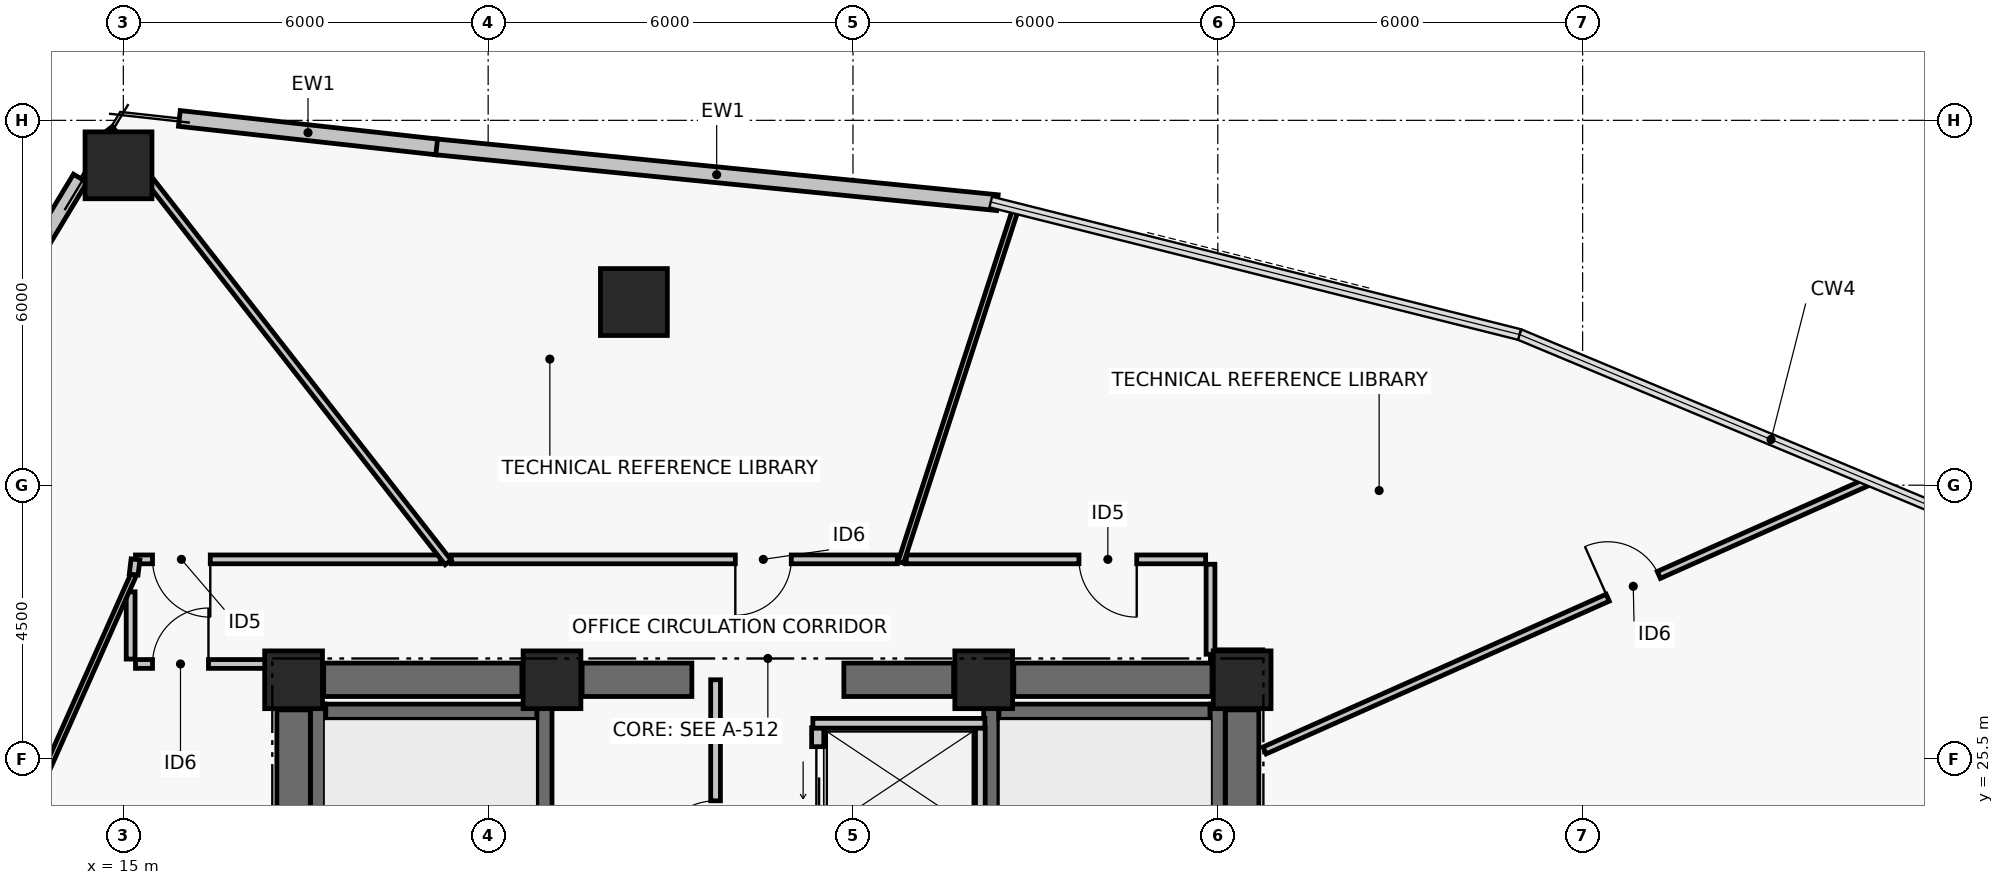
"""IFC4 building model, lengths in metres.
Left out: names, types, materials, properties, quantities, classifications, styles, units other than length and angle.
Written with IfcOpenShell. Run it as: python <this file> out.ifc"""

import sys

from ifc_helpers import new_model, si_unit, direction, frame, frame_2d, origin, origin_2d, place, context, subcontext, project, spatial, rectangle, hollow_rectangle, extrude, element, fill, save


model = new_model("IFC4")
c1 = context("Model", 3, precision=1e-05, world=origin(), true_north=direction((0.0, 1.0)))
c2 = subcontext(c1, "Body", "Model", "MODEL_VIEW")
j1 = project(units=[si_unit("LENGTHUNIT", "METRE"), si_unit("PLANEANGLEUNIT", "RADIAN")], contexts=[c1])
p1 = place(None, origin())
s1 = spatial("IfcSite", under=j1, at=p1, CompositionType="ELEMENT")
p2 = place(p1, origin())
s2 = spatial("IfcBuilding", under=s1, at=p2, CompositionType="ELEMENT")
p3 = place(p2, frame((0.0, 0.0, 161.76)))
s3 = spatial("IfcBuildingStorey", under=s2, at=p3, CompositionType="ELEMENT", Elevation=161.76)
for number, where, z_axis, x_axis in (
    (1, (17.8, 26.8, 0.0), (0.0, 0.0, 1.0), (1.0, 0.0, 0.0)),
    (2, (22.05, 26.8, 0.0), (0.0, 0.0, 1.0), (1.0, 0.0, 0.0)),
    (3, (29.15, 26.8, 0.0), (0.0, 0.0, 1.0), (1.0, 0.0, 0.0)),
    (4, (33.4, 26.8, 0.0), (0.0, 0.0, 1.0), (1.0, 0.0, 0.0)),
):
    element("IfcColumn", number, at=place(p3, frame(where, z_axis=z_axis, x_axis=x_axis)), inside=s3, PredefinedType="COLUMN", context=c2, shape_type="SweptSolid", body=[
        extrude(rectangle(XDim=0.95, YDim=0.95, at=origin_2d()), origin(), (0.0, 0.0, 1.0), 3.72),
    ])
p4 = place(p3, frame((18.295, 26.8, 0.0), z_axis=(0.0, 0.0, 1.0), x_axis=(1.0, 0.0, 0.0)))
e5 = element("IfcWall", 5, at=p4, inside=s3, PredefinedType="SHEAR", context=c2, shape_type="SweptSolid", body=[
    extrude(rectangle(XDim=3.26, YDim=0.55, at=frame_2d((1.63, 0.0))), origin(), (0.0, 0.0, 1.0), 3.5),
])
p5 = place(p3, frame((22.545, 26.8, 0.0), z_axis=(0.0, 0.0, 1.0), x_axis=(1.0, 0.0, 0.0)))
e6 = element("IfcWall", 6, at=p5, inside=s3, PredefinedType="SHEAR", context=c2, shape_type="SweptSolid", body=[
    extrude(rectangle(XDim=1.805, YDim=0.55, at=frame_2d((0.903, 0.0))), origin(), (0.0, 0.0, 1.0), 3.5),
])
p6 = place(p3, frame((26.85, 26.8, 0.0), z_axis=(0.0, 0.0, 1.0), x_axis=(1.0, 0.0, 0.0)))
e7 = element("IfcWall", 7, at=p6, inside=s3, PredefinedType="SHEAR", context=c2, shape_type="SweptSolid", body=[
    extrude(rectangle(XDim=1.805, YDim=0.55, at=frame_2d((0.902, 0.0))), origin(), (0.0, 0.0, 1.0), 3.5),
])
p7 = place(p3, frame((29.645, 26.8, 0.0), z_axis=(0.0, 0.0, 1.0), x_axis=(1.0, 0.0, 0.0)))
e8 = element("IfcWall", 8, at=p7, inside=s3, PredefinedType="SHEAR", context=c2, shape_type="SweptSolid", body=[
    extrude(rectangle(XDim=3.26, YDim=0.55, at=frame_2d((1.63, 0.0))), origin(), (0.0, 0.0, 1.0), 3.5),
])
for number, where, z_axis, x_axis in (
    (9, (17.8, 17.695, 0.0), (0.0, 0.0, 1.0), (0.0, 1.0, 0.0)),
    (10, (33.4, 17.695, 0.0), (0.0, 0.0, 1.0), (0.0, 1.0, 0.0)),
):
    element("IfcWall", number, at=place(p3, frame(where, z_axis=z_axis, x_axis=x_axis)), inside=s3, PredefinedType="SHEAR", context=c2, shape_type="SweptSolid", body=[
        extrude(rectangle(XDim=8.61, YDim=0.55, at=frame_2d((4.305, 0.0))), origin(), (0.0, 0.0, 1.0), 3.5),
    ])
p8 = place(p3, frame((18.204, 17.6, 0.0), z_axis=(0.0, 0.0, 1.0), x_axis=(0.0, 1.0, 0.0)))
e11 = element("IfcWall", 11, at=p8, inside=s3, PredefinedType="SHEAR", context=c2, shape_type="SweptSolid", body=[
    extrude(rectangle(XDim=8.8, YDim=0.25, at=frame_2d((4.4, 0.0))), origin(), (0.0, 0.0, 1.0), 3.5),
])
p9 = place(p3, frame((21.925, 17.6, 0.0), z_axis=(0.0, 0.0, 1.0), x_axis=(0.0, 1.0, 0.0)))
e12 = element("IfcWall", 12, at=p9, inside=s3, PredefinedType="SHEAR", context=c2, shape_type="SweptSolid", body=[
    extrude(rectangle(XDim=8.8, YDim=0.25, at=frame_2d((4.4, 0.0))), origin(), (0.0, 0.0, 1.0), 3.5),
])
p10 = place(p9, frame((0.35, 0.0, 0.0)))
e13 = element("IfcOpeningElement", 13, at=p10, cuts=e12, PredefinedType="OPENING", context=c2, shape_type="SweptSolid", body=[
    extrude(rectangle(XDim=1.05, YDim=2.08, at=frame_2d((0.525, 1.04))), frame((0.0, 0.135, 0.0), z_axis=(0.0, -1.0, 0.0), x_axis=(1.0, 0.0, 0.0)), (0.0, 0.0, 1.0), 0.27),
])
p11 = place(p3, frame((18.329, 26.275, 0.0), z_axis=(0.0, 0.0, 1.0), x_axis=(1.0, 0.0, 0.0)))
e14 = element("IfcWall", 14, at=p11, inside=s3, PredefinedType="SHEAR", context=c2, shape_type="SweptSolid", body=[
    extrude(rectangle(XDim=3.471, YDim=0.25, at=frame_2d((1.735, 0.0))), origin(), (0.0, 0.0, 1.0), 3.5),
])
p12 = place(p3, frame((29.275, 17.6, 0.0), z_axis=(0.0, 0.0, 1.0), x_axis=(0.0, 1.0, 0.0)))
e15 = element("IfcWall", 15, at=p12, inside=s3, PredefinedType="SHEAR", context=c2, shape_type="SweptSolid", body=[
    extrude(rectangle(XDim=8.8, YDim=0.25, at=frame_2d((4.4, 0.0))), origin(), (0.0, 0.0, 1.0), 3.5),
])
p13 = place(p12, frame((0.35, 0.0, 0.0)))
e16 = element("IfcOpeningElement", 16, at=p13, cuts=e15, PredefinedType="OPENING", context=c2, shape_type="SweptSolid", body=[
    extrude(rectangle(XDim=1.05, YDim=2.08, at=frame_2d((0.525, 1.04))), frame((0.0, 0.135, 0.0), z_axis=(0.0, -1.0, 0.0), x_axis=(1.0, 0.0, 0.0)), (0.0, 0.0, 1.0), 0.27),
])
p14 = place(p3, frame((32.996, 17.6, 0.0), z_axis=(0.0, 0.0, 1.0), x_axis=(0.0, 1.0, 0.0)))
e17 = element("IfcWall", 17, at=p14, inside=s3, PredefinedType="SHEAR", context=c2, shape_type="SweptSolid", body=[
    extrude(rectangle(XDim=8.8, YDim=0.25, at=frame_2d((4.4, 0.0))), origin(), (0.0, 0.0, 1.0), 3.5),
])
p15 = place(p3, frame((29.4, 26.275, 0.0), z_axis=(0.0, 0.0, 1.0), x_axis=(1.0, 0.0, 0.0)))
e18 = element("IfcWall", 18, at=p15, inside=s3, PredefinedType="SHEAR", context=c2, shape_type="SweptSolid", body=[
    extrude(rectangle(XDim=3.471, YDim=0.25, at=frame_2d((1.736, 0.0))), origin(), (0.0, 0.0, 1.0), 3.5),
])
for number, where, z_axis, x_axis in (
    (19, (23.397, 33.012, 0.0), (0.0, 0.0, 1.0), (1.0, 0.0, 0.0)),
    (20, (14.92, 35.26, 0.0), (0.0, 0.0, 1.0), (1.0, 0.0, 0.0)),
):
    element("IfcColumn", number, at=place(p3, frame(where, z_axis=z_axis, x_axis=x_axis)), inside=s3, PredefinedType="COLUMN", context=c2, shape_type="SweptSolid", body=[
        extrude(hollow_rectangle(XDim=1.1, YDim=1.1, WallThickness=0.045, at=origin_2d()), origin(), (0.0, 0.0, 1.0), 3.72),
    ])
p16 = place(p3, frame((20.141, 35.565, 0.0), z_axis=(0.0, 0.0, 1.0), x_axis=(0.9950896707, -0.098977508888, 0.0)))
e21 = element("IfcWall", 21, at=p16, inside=s3, PredefinedType="PARTITIONING", context=c2, shape_type="SweptSolid", body=[
    extrude(rectangle(XDim=9.28, YDim=0.26, at=frame_2d((4.64, 0.0))), origin(), (0.0, 0.0, 1.0), 3.5),
])
p17 = place(p3, frame((15.921, 36.031, 0.0), z_axis=(0.0, 0.0, 1.0), x_axis=(0.993933978819, -0.109978387641, 0.0)))
e22 = element("IfcWall", 22, at=p17, inside=s3, PredefinedType="PARTITIONING", context=c2, shape_type="SweptSolid", body=[
    extrude(rectangle(XDim=4.258, YDim=0.26, at=frame_2d((2.129, 0.0))), origin(), (0.0, 0.0, 1.0), 3.5),
])
p18 = place(p3, frame((13.221, 33.272, 0.0), z_axis=(0.0, 0.0, 1.0), x_axis=(0.516157331647, 0.856493788061, 0.0)))
e23 = element("IfcWall", 23, at=p18, inside=s3, PredefinedType="PARTITIONING", context=c2, shape_type="SweptSolid", body=[
    extrude(rectangle(XDim=2.073, YDim=0.26, at=frame_2d((1.037, 0.0))), origin(), (0.0, 0.0, 1.0), 3.5),
])
p19 = place(p3, frame((26.42, 24.29, 0.0), z_axis=(0.0, 0.0, 1.0), x_axis=(0.0, 1.0, 0.0)))
e24 = element("IfcWall", 24, at=p19, inside=s3, PredefinedType="PARTITIONING", context=c2, shape_type="SweptSolid", body=[
    extrude(rectangle(XDim=1.72, YDim=0.2, at=frame_2d((0.86, 0.0))), origin(), (0.0, 0.0, 1.0), 3.5),
])
p20 = place(p19, frame((0.31, 0.0, 0.0)))
e25 = element("IfcOpeningElement", 25, at=p20, cuts=e24, PredefinedType="OPENING", context=c2, shape_type="SweptSolid", body=[
    extrude(rectangle(XDim=1.1, YDim=2.08, at=frame_2d((0.55, 1.04))), frame((0.0, 0.11, 0.0), z_axis=(0.0, -1.0, 0.0), x_axis=(1.0, 0.0, 0.0)), (0.0, 0.0, 1.0), 0.22),
])
p21 = place(p3, frame((29.095, 20.56, 0.0), z_axis=(0.0, 0.0, 1.0), x_axis=(0.0, 1.0, 0.0)))
e26 = element("IfcWall", 26, at=p21, inside=s3, PredefinedType="PARTITIONING", context=c2, shape_type="SweptSolid", body=[
    extrude(rectangle(XDim=5.45, YDim=0.16, at=frame_2d((2.725, 0.0))), origin(), (0.0, 0.0, 1.0), 3.5),
])
p22 = place(p3, frame((26.34, 26.085, 0.0), z_axis=(0.0, 0.0, 1.0), x_axis=(1.0, 0.0, 0.0)))
e27 = element("IfcWall", 27, at=p22, inside=s3, PredefinedType="PARTITIONING", context=c2, shape_type="SweptSolid", body=[
    extrude(rectangle(XDim=2.83, YDim=0.16, at=frame_2d((1.415, 0.0))), origin(), (0.0, 0.0, 1.0), 3.5),
])
p23 = place(p3, frame((24.74, 22.43, 0.0), z_axis=(0.0, 0.0, 1.0), x_axis=(0.0, 1.0, 0.0)))
e28 = element("IfcWall", 28, at=p23, inside=s3, PredefinedType="PARTITIONING", context=c2, shape_type="SweptSolid", body=[
    extrude(rectangle(XDim=4.37, YDim=0.16, at=frame_2d((2.185, 0.0))), origin(), (0.0, 0.0, 1.0), 2.63),
])
p24 = place(p23, frame((1.4, 0.0, 0.0)))
e29 = element("IfcOpeningElement", 29, at=p24, cuts=e28, PredefinedType="OPENING", context=c2, shape_type="SweptSolid", body=[
    extrude(rectangle(XDim=0.98, YDim=2.06, at=frame_2d((0.49, 1.03))), frame((0.0, 0.09, 0.0), z_axis=(0.0, -1.0, 0.0), x_axis=(1.0, 0.0, 0.0)), (0.0, 0.0, 1.0), 0.18),
])
p25 = place(p3, frame((33.74, 27.22, 0.0), z_axis=(0.0, 0.0, 1.0), x_axis=(-1.0, 0.0, 0.0)))
e30 = element("IfcWall", 30, at=p25, inside=s3, PredefinedType="PARTITIONING", context=c2, shape_type="SweptSolid", body=[
    extrude(rectangle(XDim=0.86, YDim=0.145, at=frame_2d((0.43, 0.0))), origin(), (0.0, 0.0, 1.0), 2.63),
])
p26 = place(p3, frame((32.88, 27.22, 0.0), z_axis=(0.0, 0.0, 1.0), x_axis=(0.0, 1.0, 0.0)))
e31 = element("IfcWall", 31, at=p26, inside=s3, PredefinedType="PARTITIONING", context=c2, shape_type="SweptSolid", body=[
    extrude(rectangle(XDim=1.48, YDim=0.145, at=frame_2d((0.74, 0.0))), origin(), (0.0, 0.0, 1.0), 2.63),
])
p27 = place(p3, frame((32.8, 28.78, 0.0), z_axis=(0.0, 0.0, 1.0), x_axis=(-1.0, 0.0, 0.0)))
e32 = element("IfcWall", 32, at=p27, inside=s3, PredefinedType="PARTITIONING", context=c2, shape_type="SweptSolid", body=[
    extrude(rectangle(XDim=4.923, YDim=0.145, at=frame_2d((2.462, 0.0))), origin(), (0.0, 0.0, 1.0), 2.93),
])
p28 = place(p27, frame((1.133, 0.0, 0.0)))
e33 = element("IfcOpeningElement", 33, at=p28, cuts=e32, PredefinedType="OPENING", context=c2, shape_type="SweptSolid", body=[
    extrude(rectangle(XDim=0.95, YDim=2.06, at=frame_2d((0.475, 1.03))), frame((0.0, 0.083, 0.0), z_axis=(0.0, -1.0, 0.0), x_axis=(1.0, 0.0, 0.0)), (0.0, 0.0, 1.0), 0.165),
])
p29 = place(p3, frame((27.729, 28.78, 0.0), z_axis=(0.0, 0.0, 1.0), x_axis=(-1.0, 0.0, 0.0)))
e34 = element("IfcWall", 34, at=p29, inside=s3, PredefinedType="PARTITIONING", context=c2, shape_type="SweptSolid", body=[
    extrude(rectangle(XDim=7.338, YDim=0.145, at=frame_2d((3.669, 0.0))), origin(), (0.0, 0.0, 1.0), 2.73),
])
p30 = place(p29, frame((1.744, 0.0, 0.0)))
e35 = element("IfcOpeningElement", 35, at=p30, cuts=e34, PredefinedType="OPENING", context=c2, shape_type="SweptSolid", body=[
    extrude(rectangle(XDim=0.92, YDim=2.05, at=frame_2d((0.46, 1.025))), frame((0.0, 0.083, 0.0), z_axis=(0.0, -1.0, 0.0), x_axis=(1.0, 0.0, 0.0)), (0.0, 0.0, 1.0), 0.165),
])
p31 = place(p3, frame((20.214, 28.78, 0.0), z_axis=(0.0, 0.0, 1.0), x_axis=(-1.0, 0.0, 0.0)))
e36 = element("IfcWall", 36, at=p31, inside=s3, PredefinedType="PARTITIONING", context=c2, shape_type="SweptSolid", body=[
    extrude(rectangle(XDim=5.014, YDim=0.145, at=frame_2d((2.507, 0.0))), origin(), (0.0, 0.0, 1.0), 2.73),
])
p32 = place(p31, frame((3.784, 0.0, 0.0)))
e37 = element("IfcOpeningElement", 37, at=p32, cuts=e36, PredefinedType="OPENING", context=c2, shape_type="SweptSolid", body=[
    extrude(rectangle(XDim=0.95, YDim=2.06, at=frame_2d((0.475, 1.03))), frame((0.0, 0.083, 0.0), z_axis=(0.0, -1.0, 0.0), x_axis=(1.0, 0.0, 0.0)), (0.0, 0.0, 1.0), 0.165),
])
p33 = place(p3, frame((15.2, 27.06, 0.0), z_axis=(0.0, 0.0, 1.0), x_axis=(1.0, 0.0, 0.0)))
e38 = element("IfcWall", 38, at=p33, inside=s3, PredefinedType="PARTITIONING", context=c2, shape_type="SweptSolid", body=[
    extrude(rectangle(XDim=2.18, YDim=0.145, at=frame_2d((1.09, 0.0))), origin(), (0.0, 0.0, 1.0), 2.73),
])
p34 = place(p33, frame((0.28, 0.0, 0.0)))
e39 = element("IfcOpeningElement", 39, at=p34, cuts=e38, PredefinedType="OPENING", context=c2, shape_type="SweptSolid", body=[
    extrude(rectangle(XDim=0.92, YDim=2.05, at=frame_2d((0.46, 1.025))), frame((0.0, 0.083, 0.0), z_axis=(0.0, -1.0, 0.0), x_axis=(1.0, 0.0, 0.0)), (0.0, 0.0, 1.0), 0.165),
])
p35 = place(p3, frame((15.12, 28.247, 0.0), z_axis=(0.0, 0.0, 1.0), x_axis=(0.0, -1.0, 0.0)))
e40 = element("IfcWall", 40, at=p35, inside=s3, PredefinedType="PARTITIONING", context=c2, shape_type="SweptSolid", body=[
    extrude(rectangle(XDim=1.107, YDim=0.145, at=frame_2d((0.553, 0.0))), origin(), (0.0, 0.0, 1.0), 2.73),
])
p36 = place(p3, frame((33.77, 25.637, 0.0), z_axis=(0.0, 0.0, 1.0), x_axis=(0.913542006179, 0.406744395102, 0.0)))
e41 = element("IfcWall", 41, at=p36, inside=s3, PredefinedType="PARTITIONING", context=c2, shape_type="SweptSolid", body=[
    extrude(rectangle(XDim=10.915, YDim=0.125, at=frame_2d((5.457, 0.0))), origin(), (0.0, 0.0, 1.0), 2.63),
])
p37 = place(p36, frame((6.177, 0.0, 0.0)))
e42 = element("IfcOpeningElement", 42, at=p37, cuts=e41, PredefinedType="OPENING", context=c2, shape_type="SweptSolid", body=[
    extrude(rectangle(XDim=0.92, YDim=2.05, at=frame_2d((0.46, 1.025))), frame((0.0, 0.073, 0.0), z_axis=(0.0, -1.0, 0.0), x_axis=(1.0, 0.0, 0.0)), (0.0, 0.0, 1.0), 0.145),
])
p38 = place(p3, frame((27.787, 28.73, 0.0), z_axis=(0.0, 0.0, 1.0), x_axis=(0.309017664707, 0.951056298491, 0.0)))
e43 = element("IfcWall", 43, at=p38, inside=s3, PredefinedType="PARTITIONING", context=c2, shape_type="SweptSolid", body=[
    extrude(rectangle(XDim=6.133, YDim=0.095, at=frame_2d((3.067, 0.0))), origin(), (0.0, 0.0, 1.0), 2.93),
])
p39 = place(p3, frame((20.342, 28.73, 0.0), z_axis=(0.0, 0.0, 1.0), x_axis=(-0.615659223334, 0.78801251305, 0.0)))
e44 = element("IfcWall", 44, at=p39, inside=s3, PredefinedType="PARTITIONING", context=c2, shape_type="SweptSolid", body=[
    extrude(rectangle(XDim=9.05, YDim=0.125, at=frame_2d((4.525, 0.0))), origin(), (0.0, 0.0, 1.0), 2.93),
])
p40 = place(p3, frame((15.17, 28.531, 0.0), z_axis=(0.0, 0.0, 1.0), x_axis=(-0.406717829794, -0.913553833623, 0.0)))
e45 = element("IfcWall", 45, at=p40, inside=s3, PredefinedType="PARTITIONING", context=c2, shape_type="SweptSolid", body=[
    extrude(rectangle(XDim=8.718, YDim=0.095, at=frame_2d((4.359, 0.0))), origin(), (0.0, 0.0, 1.0), 2.73),
])
p41 = place(p3, frame((15.2, 28.78, 0.0), z_axis=(0.0, 0.0, 1.0), x_axis=(-0.119720914767, -0.992807585873, 0.0)))
e46 = element("IfcWall", 46, at=p41, inside=s3, PredefinedType="PARTITIONING", context=c2, shape_type="SweptSolid", body=[
    extrude(rectangle(XDim=0.251, YDim=0.145, at=frame_2d((0.125, 0.0))), origin(), (0.0, 0.0, 1.0), 3.5),
])
p42 = place(p20, origin())
e47 = element("IfcDoor", 47, at=p42, inside=s3, OperationType="DOUBLE_DOOR_SLIDING", PredefinedType="DOOR", context=c2, shape_type="SweptSolid", body=[
    extrude(rectangle(XDim=1.1, YDim=2.08, at=frame_2d((0.55, 1.04))), frame((0.0, 0.025, 0.0), z_axis=(0.0, -1.0, 0.0), x_axis=(1.0, 0.0, 0.0)), (0.0, 0.0, 1.0), 0.05),
])
fill(e25, e47)
p43 = place(p24, origin())
e48 = element("IfcDoor", 48, at=p43, inside=s3, OperationType="SINGLE_SWING_LEFT", PredefinedType="DOOR", context=c2, shape_type="SweptSolid", body=[
    extrude(rectangle(XDim=0.98, YDim=2.06, at=frame_2d((0.49, 1.03))), frame((0.0, 0.025, 0.0), z_axis=(0.0, -1.0, 0.0), x_axis=(1.0, 0.0, 0.0)), (0.0, 0.0, 1.0), 0.05),
])
fill(e29, e48)
p44 = place(p28, origin())
e49 = element("IfcDoor", 49, at=p44, inside=s3, OperationType="SINGLE_SWING_LEFT", PredefinedType="DOOR", context=c2, shape_type="SweptSolid", body=[
    extrude(rectangle(XDim=0.95, YDim=2.06, at=frame_2d((0.475, 1.03))), frame((0.0, 0.025, 0.0), z_axis=(0.0, -1.0, 0.0), x_axis=(1.0, 0.0, 0.0)), (0.0, 0.0, 1.0), 0.05),
])
fill(e33, e49)
p45 = place(p30, origin())
e50 = element("IfcDoor", 50, at=p45, inside=s3, OperationType="SINGLE_SWING_RIGHT", PredefinedType="DOOR", context=c2, shape_type="SweptSolid", body=[
    extrude(rectangle(XDim=0.92, YDim=2.05, at=frame_2d((0.46, 1.025))), frame((0.0, 0.025, 0.0), z_axis=(0.0, -1.0, 0.0), x_axis=(1.0, 0.0, 0.0)), (0.0, 0.0, 1.0), 0.05),
])
fill(e35, e50)
p46 = place(p32, origin())
e51 = element("IfcDoor", 51, at=p46, inside=s3, OperationType="SINGLE_SWING_LEFT", PredefinedType="DOOR", context=c2, shape_type="SweptSolid", body=[
    extrude(rectangle(XDim=0.95, YDim=2.06, at=frame_2d((0.475, 1.03))), frame((0.0, 0.025, 0.0), z_axis=(0.0, -1.0, 0.0), x_axis=(1.0, 0.0, 0.0)), (0.0, 0.0, 1.0), 0.05),
])
fill(e37, e51)
p47 = place(p34, origin())
e52 = element("IfcDoor", 52, at=p47, inside=s3, OperationType="SINGLE_SWING_RIGHT", PredefinedType="DOOR", context=c2, shape_type="SweptSolid", body=[
    extrude(rectangle(XDim=0.92, YDim=2.05, at=frame_2d((0.46, 1.025))), frame((0.0, 0.025, 0.0), z_axis=(0.0, -1.0, 0.0), x_axis=(1.0, 0.0, 0.0)), (0.0, 0.0, 1.0), 0.05),
])
fill(e39, e52)
p48 = place(p37, origin())
e53 = element("IfcDoor", 53, at=p48, inside=s3, OperationType="SINGLE_SWING_LEFT", PredefinedType="DOOR", context=c2, shape_type="SweptSolid", body=[
    extrude(rectangle(XDim=0.92, YDim=2.05, at=frame_2d((0.46, 1.025))), frame((0.0, 0.025, 0.0), z_axis=(0.0, -1.0, 0.0), x_axis=(1.0, 0.0, 0.0)), (0.0, 0.0, 1.0), 0.05),
])
fill(e42, e53)
save(model, sys.argv[1])
